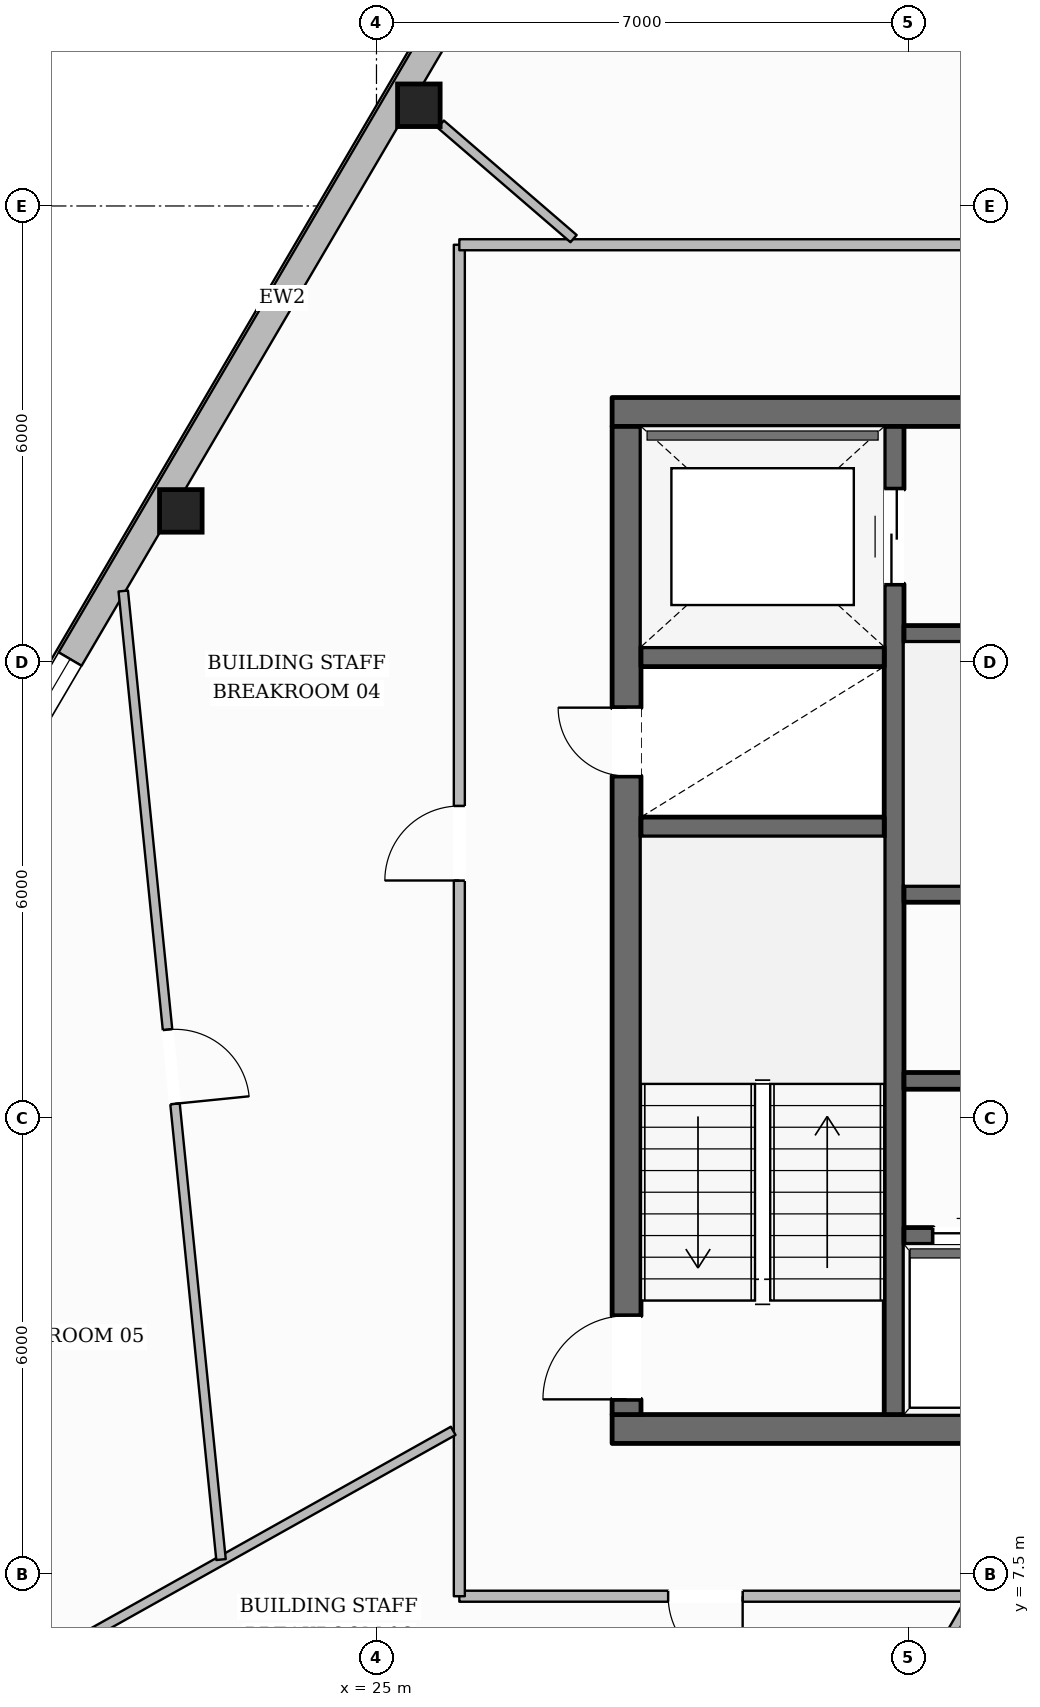
"""IFC4 building model, lengths in metres.
Left out: names, types, materials, properties, quantities, classifications, styles, units other than length and angle.
Written with IfcOpenShell. Run it as: python <this file> out.ifc"""

import sys

from ifc_helpers import new_model, si_unit, direction, frame, frame_2d, origin, origin_2d, place, context, subcontext, project, spatial, rectangle, hollow_rectangle, extrude, element, fill, save


model = new_model("IFC4")
c1 = context("Model", 3, precision=1e-05, world=origin(), true_north=direction((0.0, 1.0)))
c2 = subcontext(c1, "Body", "Model", "MODEL_VIEW")
j1 = project(units=[si_unit("LENGTHUNIT", "METRE"), si_unit("PLANEANGLEUNIT", "RADIAN")], contexts=[c1])
p1 = place(None, origin())
s1 = spatial("IfcSite", under=j1, at=p1, CompositionType="ELEMENT")
p2 = place(p1, origin())
s2 = spatial("IfcBuilding", under=s1, at=p2, CompositionType="ELEMENT")
p3 = place(p2, frame((0.0, 0.0, 270.3)))
s3 = spatial("IfcBuildingStorey", under=s2, at=p3, CompositionType="ELEMENT", Elevation=270.3)
p4 = place(p3, frame((28.1, 9.41, 0.0), z_axis=(0.0, 0.0, 1.0), x_axis=(1.0, 0.0, 0.0)))
e1 = element("IfcWall", 1, at=p4, inside=s3, PredefinedType="SOLIDWALL", context=c2, shape_type="SweptSolid", body=[
    extrude(rectangle(XDim=19.8, YDim=0.38, at=frame_2d((9.9, 0.0))), origin(), (0.0, 0.0, 1.0), 3.61),
])
p5 = place(p4, frame((10.4, 0.0, 0.0)))
e2 = element("IfcOpeningElement", 2, at=p5, cuts=e1, PredefinedType="OPENING", context=c2, shape_type="SweptSolid", body=[
    extrude(rectangle(XDim=1.4, YDim=2.2, at=frame_2d((0.7, 1.1))), frame((0.0, 0.2, 0.0), z_axis=(0.0, -1.0, 0.0), x_axis=(1.0, 0.0, 0.0)), (0.0, 0.0, 1.0), 0.4),
])
p6 = place(p3, frame((28.1, 22.79, 0.0), z_axis=(0.0, 0.0, 1.0), x_axis=(1.0, 0.0, 0.0)))
e3 = element("IfcWall", 3, at=p6, inside=s3, PredefinedType="SOLIDWALL", context=c2, shape_type="SweptSolid", body=[
    extrude(rectangle(XDim=19.8, YDim=0.38, at=frame_2d((9.9, 0.0))), origin(), (0.0, 0.0, 1.0), 3.61),
])
p7 = place(p6, frame((6.175, 0.0, 0.0)))
e4 = element("IfcOpeningElement", 4, at=p7, cuts=e3, PredefinedType="OPENING", context=c2, shape_type="SweptSolid", body=[
    extrude(rectangle(XDim=1.05, YDim=2.15, at=frame_2d((0.525, 1.075))), frame((0.0, 0.2, 0.0), z_axis=(0.0, -1.0, 0.0), x_axis=(1.0, 0.0, 0.0)), (0.0, 0.0, 1.0), 0.4),
])
p8 = place(p6, frame((12.575, 0.0, 0.0)))
e5 = element("IfcOpeningElement", 5, at=p8, cuts=e3, PredefinedType="OPENING", context=c2, shape_type="SweptSolid", body=[
    extrude(rectangle(XDim=1.05, YDim=2.15, at=frame_2d((0.525, 1.075))), frame((0.0, 0.2, 0.0), z_axis=(0.0, -1.0, 0.0), x_axis=(1.0, 0.0, 0.0)), (0.0, 0.0, 1.0), 0.4),
])
p9 = place(p3, frame((28.29, 9.6, 0.0), z_axis=(0.0, 0.0, 1.0), x_axis=(0.0, 1.0, 0.0)))
e6 = element("IfcWall", 6, at=p9, inside=s3, PredefinedType="SOLIDWALL", context=c2, shape_type="SweptSolid", body=[
    extrude(rectangle(XDim=13.0, YDim=0.38, at=frame_2d((6.5, 0.0))), origin(), (0.0, 0.0, 1.0), 3.61),
])
p10 = place(p9, frame((0.2, 0.0, 0.0)))
e7 = element("IfcOpeningElement", 7, at=p10, cuts=e6, PredefinedType="OPENING", context=c2, shape_type="SweptSolid", body=[
    extrude(rectangle(XDim=1.1, YDim=2.15, at=frame_2d((0.55, 1.075))), frame((0.0, 0.2, 0.0), z_axis=(0.0, -1.0, 0.0), x_axis=(1.0, 0.0, 0.0)), (0.0, 0.0, 1.0), 0.4),
])
p11 = place(p9, frame((8.4, 0.0, 0.0)))
e8 = element("IfcOpeningElement", 8, at=p11, cuts=e6, PredefinedType="OPENING", context=c2, shape_type="SweptSolid", body=[
    extrude(rectangle(XDim=0.9, YDim=2.1, at=frame_2d((0.45, 1.05))), frame((0.0, 0.2, 0.0), z_axis=(0.0, -1.0, 0.0), x_axis=(1.0, 0.0, 0.0)), (0.0, 0.0, 1.0), 0.4),
])
p12 = place(p3, frame((31.81, 9.6, 0.0), z_axis=(0.0, 0.0, 1.0), x_axis=(0.0, 1.0, 0.0)))
e9 = element("IfcWall", 9, at=p12, inside=s3, PredefinedType="SHEAR", context=c2, shape_type="SweptSolid", body=[
    extrude(rectangle(XDim=13.0, YDim=0.26, at=frame_2d((6.5, 0.0))), origin(), (0.0, 0.0, 1.0), 3.61),
])
p13 = place(p12, frame((10.925, 0.0, 0.0)))
e10 = element("IfcOpeningElement", 10, at=p13, cuts=e9, PredefinedType="OPENING", context=c2, shape_type="SweptSolid", body=[
    extrude(rectangle(XDim=1.25, YDim=2.25, at=frame_2d((0.625, 1.125))), frame((0.0, 0.14, 0.0), z_axis=(0.0, -1.0, 0.0), x_axis=(1.0, 0.0, 0.0)), (0.0, 0.0, 1.0), 0.28),
])
for number, where, z_axis, x_axis in (
    (11, (28.48, 17.33, 0.0), (0.0, 0.0, 1.0), (1.0, 0.0, 0.0)),
    (12, (28.48, 19.57, 0.0), (0.0, 0.0, 1.0), (1.0, 0.0, 0.0)),
):
    element("IfcWall", number, at=place(p3, frame(where, z_axis=z_axis, x_axis=x_axis)), inside=s3, PredefinedType="SHEAR", context=c2, shape_type="SweptSolid", body=[
        extrude(rectangle(XDim=3.2, YDim=0.26, at=frame_2d((1.6, 0.0))), origin(), (0.0, 0.0, 1.0), 3.61),
    ])
p14 = place(p3, frame((31.94, 19.87, 0.0), z_axis=(0.0, 0.0, 1.0), x_axis=(1.0, 0.0, 0.0)))
e13 = element("IfcWall", 13, at=p14, inside=s3, PredefinedType="SOLIDWALL", context=c2, shape_type="SweptSolid", body=[
    extrude(rectangle(XDim=12.12, YDim=0.22, at=frame_2d((6.06, 0.0))), origin(), (0.0, 0.0, 1.0), 3.61),
])
p15 = place(p14, frame((6.3, 0.0, 0.0)))
e14 = element("IfcOpeningElement", 14, at=p15, cuts=e13, PredefinedType="OPENING", context=c2, shape_type="SweptSolid", body=[
    extrude(rectangle(XDim=1.1, YDim=2.15, at=frame_2d((0.55, 1.075))), frame((0.0, 0.12, 0.0), z_axis=(0.0, -1.0, 0.0), x_axis=(1.0, 0.0, 0.0)), (0.0, 0.0, 1.0), 0.24),
])
p16 = place(p14, frame((8.23, 0.0, 0.0)))
e15 = element("IfcOpeningElement", 15, at=p16, cuts=e13, PredefinedType="OPENING", context=c2, shape_type="SweptSolid", body=[
    extrude(rectangle(XDim=0.9, YDim=2.1, at=frame_2d((0.45, 1.05))), frame((0.0, 0.12, 0.0), z_axis=(0.0, -1.0, 0.0), x_axis=(1.0, 0.0, 0.0)), (0.0, 0.0, 1.0), 0.24),
])
p17 = place(p14, frame((10.45, 0.0, 0.0)))
e16 = element("IfcOpeningElement", 16, at=p17, cuts=e13, PredefinedType="OPENING", context=c2, shape_type="SweptSolid", body=[
    extrude(rectangle(XDim=0.9, YDim=2.1, at=frame_2d((0.45, 1.05))), frame((0.0, 0.12, 0.0), z_axis=(0.0, -1.0, 0.0), x_axis=(1.0, 0.0, 0.0)), (0.0, 0.0, 1.0), 0.24),
])
p18 = place(p3, frame((31.94, 16.45, 0.0), z_axis=(0.0, 0.0, 1.0), x_axis=(1.0, 0.0, 0.0)))
e17 = element("IfcWall", 17, at=p18, inside=s3, PredefinedType="SOLIDWALL", context=c2, shape_type="SweptSolid", body=[
    extrude(rectangle(XDim=12.12, YDim=0.22, at=frame_2d((6.06, 0.0))), origin(), (0.0, 0.0, 1.0), 3.61),
])
p19 = place(p3, frame((31.94, 13.99, 0.0), z_axis=(0.0, 0.0, 1.0), x_axis=(1.0, 0.0, 0.0)))
e18 = element("IfcWall", 18, at=p19, inside=s3, PredefinedType="SOLIDWALL", context=c2, shape_type="SweptSolid", body=[
    extrude(rectangle(XDim=12.12, YDim=0.22, at=frame_2d((6.06, 0.0))), origin(), (0.0, 0.0, 1.0), 3.61),
])
p20 = place(p19, frame((3.11, 0.0, 0.0)))
e19 = element("IfcOpeningElement", 19, at=p20, cuts=e18, PredefinedType="OPENING", context=c2, shape_type="SweptSolid", body=[
    extrude(rectangle(XDim=0.9, YDim=2.1, at=frame_2d((0.45, 1.05))), frame((0.0, 0.12, 0.0), z_axis=(0.0, -1.0, 0.0), x_axis=(1.0, 0.0, 0.0)), (0.0, 0.0, 1.0), 0.24),
])
p21 = place(p19, frame((9.21, 0.0, 0.0)))
e20 = element("IfcOpeningElement", 20, at=p21, cuts=e18, PredefinedType="OPENING", context=c2, shape_type="SweptSolid", body=[
    extrude(rectangle(XDim=0.9, YDim=2.1, at=frame_2d((0.45, 1.05))), frame((0.0, 0.12, 0.0), z_axis=(0.0, -1.0, 0.0), x_axis=(1.0, 0.0, 0.0)), (0.0, 0.0, 1.0), 0.24),
])
p22 = place(p3, frame((31.94, 11.95, 0.0), z_axis=(0.0, 0.0, 1.0), x_axis=(1.0, 0.0, 0.0)))
e21 = element("IfcWall", 21, at=p22, inside=s3, PredefinedType="SOLIDWALL", context=c2, shape_type="SweptSolid", body=[
    extrude(rectangle(XDim=6.19, YDim=0.22, at=frame_2d((3.095, 0.0))), origin(), (0.0, 0.0, 1.0), 3.61),
])
p23 = place(p22, frame((0.385, 0.0, 0.0)))
e22 = element("IfcOpeningElement", 22, at=p23, cuts=e21, PredefinedType="OPENING", context=c2, shape_type="SweptSolid", body=[
    extrude(rectangle(XDim=1.1, YDim=2.2, at=frame_2d((0.55, 1.1))), frame((0.0, 0.12, 0.0), z_axis=(0.0, -1.0, 0.0), x_axis=(1.0, 0.0, 0.0)), (0.0, 0.0, 1.0), 0.24),
])
p24 = place(p22, frame((2.435, 0.0, 0.0)))
e23 = element("IfcOpeningElement", 23, at=p24, cuts=e21, PredefinedType="OPENING", context=c2, shape_type="SweptSolid", body=[
    extrude(rectangle(XDim=1.1, YDim=2.2, at=frame_2d((0.55, 1.1))), frame((0.0, 0.12, 0.0), z_axis=(0.0, -1.0, 0.0), x_axis=(1.0, 0.0, 0.0)), (0.0, 0.0, 1.0), 0.24),
])
p25 = place(p22, frame((4.485, 0.0, 0.0)))
e24 = element("IfcOpeningElement", 24, at=p25, cuts=e21, PredefinedType="OPENING", context=c2, shape_type="SweptSolid", body=[
    extrude(rectangle(XDim=1.1, YDim=2.2, at=frame_2d((0.55, 1.1))), frame((0.0, 0.12, 0.0), z_axis=(0.0, -1.0, 0.0), x_axis=(1.0, 0.0, 0.0)), (0.0, 0.0, 1.0), 0.24),
])
for number, where, z_axis, x_axis in (
    (25, (25.558, 26.825, 0.0), (0.0, 0.0, 1.0), (1.0, 0.0, 0.0)),
    (26, (22.426, 21.489, 0.0), (0.0, 0.0, 1.0), (1.0, 0.0, 0.0)),
):
    element("IfcColumn", number, at=place(p3, frame(where, z_axis=z_axis, x_axis=x_axis)), inside=s3, PredefinedType="COLUMN", context=c2, shape_type="SweptSolid", body=[
        extrude(hollow_rectangle(XDim=0.56, YDim=0.56, WallThickness=0.025, at=origin_2d()), origin(), (0.0, 0.0, 1.0), 3.61),
    ])
p26 = place(p3, frame((15.686, 10.536, 0.0), z_axis=(0.0, 0.0, 1.0), x_axis=(0.506100645038, 0.862474426921, 0.0)))
e27 = element("IfcWall", 27, at=p26, inside=s3, PredefinedType="STANDARD", context=c2, shape_type="SweptSolid", body=[
    extrude(rectangle(XDim=38.084, YDim=0.35, at=frame_2d((19.042, 0.0))), origin(), (0.0, 0.0, 1.0), 3.196),
])
p27 = place(p26, frame((27.963, 0.0, 0.0)))
e28 = element("IfcOpeningElement", 28, at=p27, cuts=e27, PredefinedType="OPENING", context=c2, shape_type="SweptSolid", body=[
    extrude(rectangle(XDim=1.0, YDim=2.2, at=frame_2d((0.5, 1.1))), frame((0.0, 0.185, 0.0), z_axis=(0.0, -1.0, 0.0), x_axis=(1.0, 0.0, 0.0)), (0.0, 0.0, 1.0), 0.37),
])
p28 = place(p26, frame((33.839, 0.0, 0.65)))
e29 = element("IfcOpeningElement", 29, at=p28, cuts=e27, PredefinedType="OPENING", context=c2, shape_type="SweptSolid", body=[
    extrude(rectangle(XDim=1.35, YDim=1.75, at=frame_2d((0.675, 0.875))), frame((0.0, 0.185, 0.0), z_axis=(0.0, -1.0, 0.0), x_axis=(1.0, 0.0, 0.0)), (0.0, 0.0, 1.0), 0.37),
])
p29 = place(p26, frame((21.464, 0.0, 0.65)))
e30 = element("IfcOpeningElement", 30, at=p29, cuts=e27, PredefinedType="OPENING", context=c2, shape_type="SweptSolid", body=[
    extrude(rectangle(XDim=1.35, YDim=1.75, at=frame_2d((0.675, 0.875))), frame((0.0, 0.185, 0.0), z_axis=(0.0, -1.0, 0.0), x_axis=(1.0, 0.0, 0.0)), (0.0, 0.0, 1.0), 0.37),
])
p30 = place(p26, frame((9.089, 0.0, 0.65)))
e31 = element("IfcOpeningElement", 31, at=p30, cuts=e27, PredefinedType="OPENING", context=c2, shape_type="SweptSolid", body=[
    extrude(rectangle(XDim=1.35, YDim=1.75, at=frame_2d((0.675, 0.875))), frame((0.0, 0.185, 0.0), z_axis=(0.0, -1.0, 0.0), x_axis=(1.0, 0.0, 0.0)), (0.0, 0.0, 1.0), 0.37),
])
p31 = place(p26, frame((2.902, 0.0, 0.65)))
e32 = element("IfcOpeningElement", 32, at=p31, cuts=e27, PredefinedType="OPENING", context=c2, shape_type="SweptSolid", body=[
    extrude(rectangle(XDim=1.35, YDim=1.75, at=frame_2d((0.675, 0.875))), frame((0.0, 0.185, 0.0), z_axis=(0.0, -1.0, 0.0), x_axis=(1.0, 0.0, 0.0)), (0.0, 0.0, 1.0), 0.37),
])
p32 = place(p3, frame((49.91, 7.21, 0.0), z_axis=(0.0, 0.0, 1.0), x_axis=(-1.0, 0.0, 0.0)))
e33 = element("IfcWall", 33, at=p32, inside=s3, PredefinedType="PARTITIONING", context=c2, shape_type="SweptSolid", body=[
    extrude(rectangle(XDim=23.82, YDim=0.145, at=frame_2d((11.91, 0.0))), origin(), (0.0, 0.0, 1.0), 3.61),
])
p33 = place(p32, frame((20.093, 0.0, 0.0)))
e34 = element("IfcOpeningElement", 34, at=p33, cuts=e33, PredefinedType="OPENING", context=c2, shape_type="SweptSolid", body=[
    extrude(rectangle(XDim=0.98, YDim=2.15, at=frame_2d((0.49, 1.075))), frame((0.0, 0.083, 0.0), z_axis=(0.0, -1.0, 0.0), x_axis=(1.0, 0.0, 0.0)), (0.0, 0.0, 1.0), 0.165),
])
p34 = place(p32, frame((11.091, 0.0, 0.0)))
e35 = element("IfcOpeningElement", 35, at=p34, cuts=e33, PredefinedType="OPENING", context=c2, shape_type="SweptSolid", body=[
    extrude(rectangle(XDim=1.02, YDim=2.15, at=frame_2d((0.51, 1.075))), frame((0.0, 0.083, 0.0), z_axis=(0.0, -1.0, 0.0), x_axis=(1.0, 0.0, 0.0)), (0.0, 0.0, 1.0), 0.165),
])
p35 = place(p32, frame((2.361, 0.0, 0.0)))
e36 = element("IfcOpeningElement", 36, at=p35, cuts=e33, PredefinedType="OPENING", context=c2, shape_type="SweptSolid", body=[
    extrude(rectangle(XDim=0.98, YDim=2.15, at=frame_2d((0.49, 1.075))), frame((0.0, 0.083, 0.0), z_axis=(0.0, -1.0, 0.0), x_axis=(1.0, 0.0, 0.0)), (0.0, 0.0, 1.0), 0.165),
])
p36 = place(p3, frame((26.09, 7.21, 0.0), z_axis=(0.0, 0.0, 1.0), x_axis=(0.0, 1.0, 0.0)))
e37 = element("IfcWall", 37, at=p36, inside=s3, PredefinedType="PARTITIONING", context=c2, shape_type="SweptSolid", body=[
    extrude(rectangle(XDim=17.78, YDim=0.145, at=frame_2d((8.89, 0.0))), origin(), (0.0, 0.0, 1.0), 3.349),
])
p37 = place(p36, frame((9.416, 0.0, 0.0)))
e38 = element("IfcOpeningElement", 38, at=p37, cuts=e37, PredefinedType="OPENING", context=c2, shape_type="SweptSolid", body=[
    extrude(rectangle(XDim=0.98, YDim=2.15, at=frame_2d((0.49, 1.075))), frame((0.0, 0.083, 0.0), z_axis=(0.0, -1.0, 0.0), x_axis=(1.0, 0.0, 0.0)), (0.0, 0.0, 1.0), 0.165),
])
p38 = place(p3, frame((26.09, 24.99, 0.0), z_axis=(0.0, 0.0, 1.0), x_axis=(1.0, 0.0, 0.0)))
e39 = element("IfcWall", 39, at=p38, inside=s3, PredefinedType="PARTITIONING", context=c2, shape_type="SweptSolid", body=[
    extrude(rectangle(XDim=17.11, YDim=0.145, at=frame_2d((8.555, 0.0))), origin(), (0.0, 0.0, 1.0), 3.61),
])
p39 = place(p38, frame((8.47, 0.0, 0.0)))
e40 = element("IfcOpeningElement", 40, at=p39, cuts=e39, PredefinedType="OPENING", context=c2, shape_type="SweptSolid", body=[
    extrude(rectangle(XDim=0.88, YDim=2.1, at=frame_2d((0.44, 1.05))), frame((0.0, 0.083, 0.0), z_axis=(0.0, -1.0, 0.0), x_axis=(1.0, 0.0, 0.0)), (0.0, 0.0, 1.0), 0.165),
])
p40 = place(p38, frame((10.99, 0.0, 0.0)))
e41 = element("IfcOpeningElement", 41, at=p40, cuts=e39, PredefinedType="OPENING", context=c2, shape_type="SweptSolid", body=[
    extrude(rectangle(XDim=0.88, YDim=2.1, at=frame_2d((0.44, 1.05))), frame((0.0, 0.083, 0.0), z_axis=(0.0, -1.0, 0.0), x_axis=(1.0, 0.0, 0.0)), (0.0, 0.0, 1.0), 0.165),
])
p41 = place(p38, frame((13.37, 0.0, 0.0)))
e42 = element("IfcOpeningElement", 42, at=p41, cuts=e39, PredefinedType="OPENING", context=c2, shape_type="SweptSolid", body=[
    extrude(rectangle(XDim=0.96, YDim=2.1, at=frame_2d((0.48, 1.05))), frame((0.0, 0.083, 0.0), z_axis=(0.0, -1.0, 0.0), x_axis=(1.0, 0.0, 0.0)), (0.0, 0.0, 1.0), 0.165),
])
p42 = place(p3, frame((27.593, 25.071, 0.0), z_axis=(0.0, 0.0, 1.0), x_axis=(-0.757498383129, 0.652837039051, 0.0)))
e43 = element("IfcWall", 43, at=p42, inside=s3, PredefinedType="PARTITIONING", context=c2, shape_type="SweptSolid", body=[
    extrude(rectangle(XDim=2.307, YDim=0.125, at=frame_2d((1.154, 0.0))), origin(), (0.0, 0.0, 1.0), 3.61),
])
p43 = place(p3, frame((26.01, 9.386, 0.0), z_axis=(0.0, 0.0, 1.0), x_axis=(-0.872521690704, -0.488575377246, 0.0)))
e44 = element("IfcWall", 44, at=p43, inside=s3, PredefinedType="PARTITIONING", context=c2, shape_type="SweptSolid", body=[
    extrude(rectangle(XDim=7.437, YDim=0.125, at=frame_2d((3.718, 0.0))), origin(), (0.0, 0.0, 1.0), 3.246),
])
p44 = place(p3, frame((32.799, 7.129, 0.0), z_axis=(0.0, 0.0, 1.0), x_axis=(-0.501718089772, -0.865031189262, 0.0)))
e45 = element("IfcWall", 45, at=p44, inside=s3, PredefinedType="PARTITIONING", context=c2, shape_type="SweptSolid", body=[
    extrude(rectangle(XDim=1.496, YDim=0.125, at=frame_2d((0.748, 0.0))), origin(), (0.0, 0.0, 1.0), 3.61),
])
p45 = place(p3, frame((21.669, 20.435, 0.0), z_axis=(0.0, 0.0, 1.0), x_axis=(0.100422843379, -0.994944848988, 0.0)))
e46 = element("IfcWall", 46, at=p45, inside=s3, PredefinedType="PARTITIONING", context=c2, shape_type="SweptSolid", body=[
    extrude(rectangle(XDim=12.807, YDim=0.125, at=frame_2d((6.404, 0.0))), origin(), (0.0, 0.0, 1.0), 3.349),
])
p46 = place(p45, frame((5.8, 0.0, 0.0)))
e47 = element("IfcOpeningElement", 47, at=p46, cuts=e46, PredefinedType="OPENING", context=c2, shape_type="SweptSolid", body=[
    extrude(rectangle(XDim=0.98, YDim=2.15, at=frame_2d((0.49, 1.075))), frame((0.0, 0.073, 0.0), z_axis=(0.0, -1.0, 0.0), x_axis=(1.0, 0.0, 0.0)), (0.0, 0.0, 1.0), 0.145),
])
p47 = place(p30, origin())
e48 = element("IfcWindow", 48, at=p47, inside=s3, PartitioningType="SINGLE_PANEL", PredefinedType="WINDOW", context=c2, shape_type="SweptSolid", body=[
    extrude(rectangle(XDim=1.35, YDim=1.75, at=frame_2d((0.675, 0.875))), frame((0.0, 0.03, 0.0), z_axis=(0.0, -1.0, 0.0), x_axis=(1.0, 0.0, 0.0)), (0.0, 0.0, 1.0), 0.06),
])
fill(e31, e48)
p48 = place(p10, origin())
e49 = element("IfcDoor", 49, at=p48, inside=s3, OperationType="SINGLE_SWING_LEFT", PredefinedType="DOOR", context=c2, shape_type="SweptSolid", body=[
    extrude(rectangle(XDim=1.1, YDim=2.15, at=frame_2d((0.55, 1.075))), frame((0.0, 0.025, 0.0), z_axis=(0.0, -1.0, 0.0), x_axis=(1.0, 0.0, 0.0)), (0.0, 0.0, 1.0), 0.05),
])
fill(e7, e49)
p49 = place(p11, origin())
e50 = element("IfcDoor", 50, at=p49, inside=s3, OperationType="SINGLE_SWING_RIGHT", PredefinedType="DOOR", context=c2, shape_type="SweptSolid", body=[
    extrude(rectangle(XDim=0.9, YDim=2.1, at=frame_2d((0.45, 1.05))), frame((0.0, 0.025, 0.0), z_axis=(0.0, -1.0, 0.0), x_axis=(1.0, 0.0, 0.0)), (0.0, 0.0, 1.0), 0.05),
])
fill(e8, e50)
p50 = place(p13, origin())
e51 = element("IfcDoor", 51, at=p50, inside=s3, OperationType="DOUBLE_DOOR_SLIDING", PredefinedType="DOOR", context=c2, shape_type="SweptSolid", body=[
    extrude(rectangle(XDim=1.25, YDim=2.25, at=frame_2d((0.625, 1.125))), frame((0.0, 0.025, 0.0), z_axis=(0.0, -1.0, 0.0), x_axis=(1.0, 0.0, 0.0)), (0.0, 0.0, 1.0), 0.05),
])
fill(e10, e51)
p51 = place(p23, origin())
e52 = element("IfcDoor", 52, at=p51, inside=s3, OperationType="DOUBLE_DOOR_SLIDING", PredefinedType="DOOR", context=c2, shape_type="SweptSolid", body=[
    extrude(rectangle(XDim=1.1, YDim=2.2, at=frame_2d((0.55, 1.1))), frame((0.0, 0.025, 0.0), z_axis=(0.0, -1.0, 0.0), x_axis=(1.0, 0.0, 0.0)), (0.0, 0.0, 1.0), 0.05),
])
fill(e22, e52)
p52 = place(p37, origin())
e53 = element("IfcDoor", 53, at=p52, inside=s3, OperationType="SINGLE_SWING_LEFT", PredefinedType="DOOR", context=c2, shape_type="SweptSolid", body=[
    extrude(rectangle(XDim=0.98, YDim=2.15, at=frame_2d((0.49, 1.075))), frame((0.0, 0.025, 0.0), z_axis=(0.0, -1.0, 0.0), x_axis=(1.0, 0.0, 0.0)), (0.0, 0.0, 1.0), 0.05),
])
fill(e38, e53)
p53 = place(p46, origin())
e54 = element("IfcDoor", 54, at=p53, inside=s3, OperationType="SINGLE_SWING_RIGHT", PredefinedType="DOOR", context=c2, shape_type="SweptSolid", body=[
    extrude(rectangle(XDim=0.98, YDim=2.15, at=frame_2d((0.49, 1.075))), frame((0.0, 0.025, 0.0), z_axis=(0.0, -1.0, 0.0), x_axis=(1.0, 0.0, 0.0)), (0.0, 0.0, 1.0), 0.05),
])
fill(e47, e54)
p54 = place(p33, origin())
e55 = element("IfcDoor", 55, at=p54, inside=s3, OperationType="SINGLE_SWING_LEFT", PredefinedType="DOOR", context=c2, shape_type="SweptSolid", body=[
    extrude(rectangle(XDim=0.98, YDim=2.15, at=frame_2d((0.49, 1.075))), frame((0.0, 0.025, 0.0), z_axis=(0.0, -1.0, 0.0), x_axis=(1.0, 0.0, 0.0)), (0.0, 0.0, 1.0), 0.05),
])
fill(e34, e55)
save(model, sys.argv[1])
